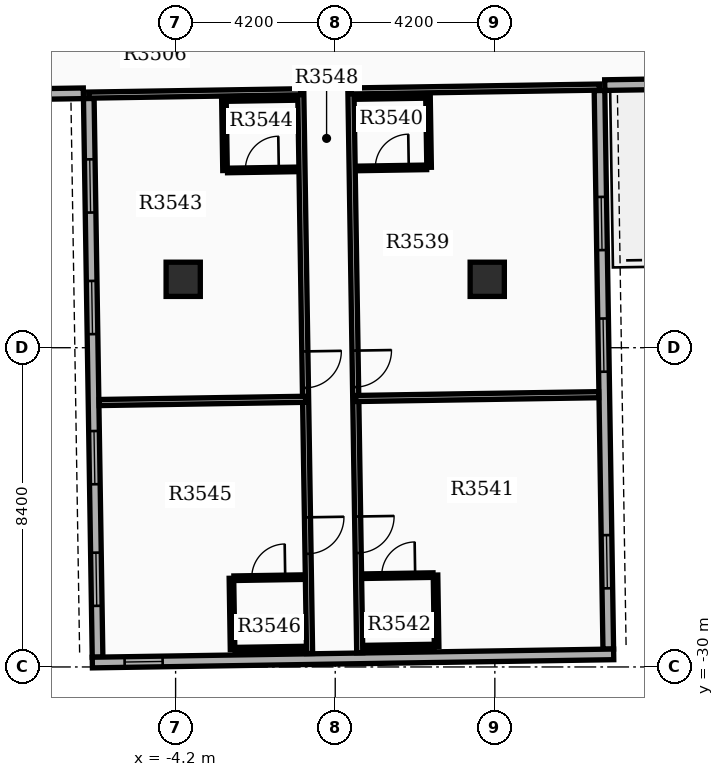
"""IFC4 building model, lengths in metres.
Left out: names, types, materials, properties, quantities, classifications, styles, units other than length and angle.
Written with IfcOpenShell. Run it as: python <this file> out.ifc"""

import sys

from ifc_helpers import new_model, si_unit, direction, frame, frame_2d, origin, origin_2d, place, context, subcontext, project, spatial, rectangle, extrude, element, fill, save


model = new_model("IFC4")
c1 = context("Model", 3, precision=1e-05, world=origin(), true_north=direction((0.0, 1.0)))
c2 = subcontext(c1, "Body", "Model", "MODEL_VIEW")
j1 = project(units=[si_unit("LENGTHUNIT", "METRE"), si_unit("PLANEANGLEUNIT", "RADIAN")], contexts=[c1])
p1 = place(None, origin())
s1 = spatial("IfcSite", under=j1, at=p1, CompositionType="ELEMENT")
p2 = place(p1, origin())
s2 = spatial("IfcBuilding", under=s1, at=p2, CompositionType="ELEMENT")
p3 = place(p2, frame((0.0, 0.0, 220.8)))
s3 = spatial("IfcBuildingStorey", under=s2, at=p3, CompositionType="ELEMENT", Elevation=220.8)
for number, where, z_axis, x_axis in (
    (1, (-4.0, -19.8, 0.0), (0.0, 0.0, 1.0), (1.0, 0.0, 0.0)),
    (2, (4.0, -19.8, 0.0), (0.0, 0.0, 1.0), (1.0, 0.0, 0.0)),
):
    element("IfcColumn", number, at=place(p3, frame(where, z_axis=z_axis, x_axis=x_axis)), inside=s3, PredefinedType="COLUMN", context=c2, shape_type="SweptSolid", body=[
        extrude(rectangle(XDim=0.9, YDim=0.9, at=origin_2d()), origin(), (0.0, 0.0, 1.0), 3.9),
    ])
p4 = place(p3, frame((-6.485, -15.044, 0.0), z_axis=(0.0, 0.0, 1.0), x_axis=(0.015711302158, -0.999876569875, 0.0)))
e3 = element("IfcWall", 3, at=p4, inside=s3, PredefinedType="STANDARD", context=c2, shape_type="SweptSolid", body=[
    extrude(rectangle(XDim=14.7, YDim=0.28, at=frame_2d((7.35, 0.0))), origin(), (0.0, 0.0, 1.0), 3.18),
])
p5 = place(p4, frame((1.6, 0.0, 0.8)))
e4 = element("IfcOpeningElement", 4, at=p5, cuts=e3, PredefinedType="OPENING", context=c2, shape_type="SweptSolid", body=[
    extrude(rectangle(XDim=1.4, YDim=1.6, at=frame_2d((0.7, 0.8))), frame((0.0, 0.15, 0.0), z_axis=(0.0, -1.0, 0.0), x_axis=(1.0, 0.0, 0.0)), (0.0, 0.0, 1.0), 0.3),
])
p6 = place(p4, frame((4.8, 0.0, 0.8)))
e5 = element("IfcOpeningElement", 5, at=p6, cuts=e3, PredefinedType="OPENING", context=c2, shape_type="SweptSolid", body=[
    extrude(rectangle(XDim=1.4, YDim=1.6, at=frame_2d((0.7, 0.8))), frame((0.0, 0.15, 0.0), z_axis=(0.0, -1.0, 0.0), x_axis=(1.0, 0.0, 0.0)), (0.0, 0.0, 1.0), 0.3),
])
p7 = place(p4, frame((8.75, 0.0, 0.8)))
e6 = element("IfcOpeningElement", 6, at=p7, cuts=e3, PredefinedType="OPENING", context=c2, shape_type="SweptSolid", body=[
    extrude(rectangle(XDim=1.4, YDim=1.6, at=frame_2d((0.7, 0.8))), frame((0.0, 0.15, 0.0), z_axis=(0.0, -1.0, 0.0), x_axis=(1.0, 0.0, 0.0)), (0.0, 0.0, 1.0), 0.3),
])
p8 = place(p4, frame((11.95, 0.0, 0.8)))
e7 = element("IfcOpeningElement", 7, at=p8, cuts=e3, PredefinedType="OPENING", context=c2, shape_type="SweptSolid", body=[
    extrude(rectangle(XDim=1.4, YDim=1.6, at=frame_2d((0.7, 0.8))), frame((0.0, 0.15, 0.0), z_axis=(0.0, -1.0, 0.0), x_axis=(1.0, 0.0, 0.0)), (0.0, 0.0, 1.0), 0.3),
])
p9 = place(p3, frame((7.185, -29.531, 0.0), z_axis=(0.0, 0.0, 1.0), x_axis=(-0.015711302158, 0.999876569875, 0.0)))
e8 = element("IfcWall", 8, at=p9, inside=s3, PredefinedType="STANDARD", context=c2, shape_type="SweptSolid", body=[
    extrude(rectangle(XDim=14.7, YDim=0.28, at=frame_2d((7.35, 0.0))), origin(), (0.0, 0.0, 1.0), 3.18),
])
p10 = place(p9, frame((1.6, 0.0, 0.8)))
e9 = element("IfcOpeningElement", 9, at=p10, cuts=e8, PredefinedType="OPENING", context=c2, shape_type="SweptSolid", body=[
    extrude(rectangle(XDim=1.4, YDim=1.6, at=frame_2d((0.7, 0.8))), frame((0.0, 0.15, 0.0), z_axis=(0.0, -1.0, 0.0), x_axis=(1.0, 0.0, 0.0)), (0.0, 0.0, 1.0), 0.3),
])
p11 = place(p9, frame((7.3, 0.0, 0.8)))
e10 = element("IfcOpeningElement", 10, at=p11, cuts=e8, PredefinedType="OPENING", context=c2, shape_type="SweptSolid", body=[
    extrude(rectangle(XDim=1.4, YDim=1.6, at=frame_2d((0.7, 0.8))), frame((0.0, 0.15, 0.0), z_axis=(0.0, -1.0, 0.0), x_axis=(1.0, 0.0, 0.0)), (0.0, 0.0, 1.0), 0.3),
])
p12 = place(p9, frame((10.5, 0.0, 0.8)))
e11 = element("IfcOpeningElement", 11, at=p12, cuts=e8, PredefinedType="OPENING", context=c2, shape_type="SweptSolid", body=[
    extrude(rectangle(XDim=1.4, YDim=1.6, at=frame_2d((0.7, 0.8))), frame((0.0, 0.15, 0.0), z_axis=(0.0, -1.0, 0.0), x_axis=(1.0, 0.0, 0.0)), (0.0, 0.0, 1.0), 0.3),
])
p13 = place(p3, frame((-6.391, -29.884, 0.0), z_axis=(0.0, 0.0, 1.0), x_axis=(0.999876828887, 0.015694809807, 0.0)))
e12 = element("IfcWall", 12, at=p13, inside=s3, PredefinedType="STANDARD", context=c2, shape_type="SweptSolid", body=[
    extrude(rectangle(XDim=13.72, YDim=0.28, at=frame_2d((6.86, 0.0))), origin(), (0.0, 0.0, 1.0), 3.18),
])
p14 = place(p13, frame((0.85, 0.0, 0.85)))
e13 = element("IfcOpeningElement", 13, at=p14, cuts=e12, PredefinedType="OPENING", context=c2, shape_type="SweptSolid", body=[
    extrude(rectangle(XDim=1.0, YDim=1.5, at=frame_2d((0.5, 0.75))), frame((0.0, 0.15, 0.0), z_axis=(0.0, -1.0, 0.0), x_axis=(1.0, 0.0, 0.0)), (0.0, 0.0, 1.0), 0.3),
])
p15 = place(p3, frame((-12.926, -15.005, 0.0), z_axis=(0.0, 0.0, 1.0), x_axis=(0.999876823822, 0.015695132501, 0.0)))
e14 = element("IfcWall", 14, at=p15, inside=s3, PredefinedType="STANDARD", context=c2, shape_type="SweptSolid", body=[
    extrude(rectangle(XDim=6.3, YDim=0.28, at=frame_2d((3.15, 0.0))), origin(), (0.0, 0.0, 1.0), 3.18),
])
p16 = place(p3, frame((13.391, -14.592, 0.0), z_axis=(0.0, 0.0, 1.0), x_axis=(-0.999876833368, -0.015694524359, 0.0)))
e15 = element("IfcWall", 15, at=p16, inside=s3, PredefinedType="STANDARD", context=c2, shape_type="SweptSolid", body=[
    extrude(rectangle(XDim=6.3, YDim=0.28, at=frame_2d((3.15, 0.0))), origin(), (0.0, 0.0, 1.0), 3.18),
])
p17 = place(p3, frame((0.413, -14.845, 0.0), z_axis=(0.0, 0.0, 1.0), x_axis=(0.015723196507, -0.999876382905, 0.0)))
e16 = element("IfcWall", 16, at=p17, inside=s3, PredefinedType="PARTITIONING", context=c2, shape_type="SweptSolid", body=[
    extrude(rectangle(XDim=14.782, YDim=0.16, at=frame_2d((7.391, 0.0))), origin(), (0.0, 0.0, 1.0), 3.17),
])
p18 = place(p17, frame((6.832, 0.0, 0.0)))
e17 = element("IfcOpeningElement", 17, at=p18, cuts=e16, PredefinedType="OPENING", context=c2, shape_type="SweptSolid", body=[
    extrude(rectangle(XDim=0.96, YDim=2.15, at=frame_2d((0.48, 1.075))), frame((0.0, 0.09, 0.0), z_axis=(0.0, -1.0, 0.0), x_axis=(1.0, 0.0, 0.0)), (0.0, 0.0, 1.0), 0.18),
])
p19 = place(p17, frame((11.198, 0.0, 0.0)))
e18 = element("IfcOpeningElement", 18, at=p19, cuts=e16, PredefinedType="OPENING", context=c2, shape_type="SweptSolid", body=[
    extrude(rectangle(XDim=0.96, YDim=2.15, at=frame_2d((0.48, 1.075))), frame((0.0, 0.09, 0.0), z_axis=(0.0, -1.0, 0.0), x_axis=(1.0, 0.0, 0.0)), (0.0, 0.0, 1.0), 0.18),
])
p20 = place(p3, frame((0.413, -14.845, 0.0), z_axis=(0.0, 0.0, 1.0), x_axis=(0.999877084909, 0.015678490784, 0.0)))
e19 = element("IfcWall", 19, at=p20, inside=s3, PredefinedType="PARTITIONING", context=c2, shape_type="SweptSolid", body=[
    extrude(rectangle(XDim=6.54, YDim=0.16, at=frame_2d((3.27, 0.0))), origin(), (0.0, 0.0, 1.0), 3.17),
])
p21 = place(p3, frame((0.54, -22.936, 0.0), z_axis=(0.0, 0.0, 1.0), x_axis=(0.999876774542, 0.015698271615, 0.0)))
e20 = element("IfcWall", 20, at=p21, inside=s3, PredefinedType="PARTITIONING", context=c2, shape_type="SweptSolid", body=[
    extrude(rectangle(XDim=6.392, YDim=0.16, at=frame_2d((3.196, 0.0))), origin(), (0.0, 0.0, 1.0), 3.17),
])
p22 = place(p3, frame((0.585, -16.883, 0.0), z_axis=(0.0, 0.0, 1.0), x_axis=(0.999876836305, 0.015694337248, 0.0)))
e21 = element("IfcWall", 21, at=p22, inside=s3, PredefinedType="PARTITIONING", context=c2, shape_type="SweptSolid", body=[
    extrude(rectangle(XDim=1.82, YDim=0.12, at=frame_2d((0.91, 0.0))), origin(), (0.0, 0.0, 1.0), 3.17),
])
p23 = place(p22, frame((0.47, 0.0, 0.0)))
e22 = element("IfcOpeningElement", 22, at=p23, cuts=e21, PredefinedType="OPENING", context=c2, shape_type="SweptSolid", body=[
    extrude(rectangle(XDim=0.88, YDim=2.1, at=frame_2d((0.44, 1.05))), frame((0.0, 0.07, 0.0), z_axis=(0.0, -1.0, 0.0), x_axis=(1.0, 0.0, 0.0)), (0.0, 0.0, 1.0), 0.14),
])
p24 = place(p3, frame((0.556, -15.003, 0.0), z_axis=(0.0, 0.0, 1.0), x_axis=(0.999876836305, 0.015694337248, 0.0)))
e23 = element("IfcWall", 23, at=p24, inside=s3, PredefinedType="PARTITIONING", context=c2, shape_type="SweptSolid", body=[
    extrude(rectangle(XDim=1.82, YDim=0.12, at=frame_2d((0.91, 0.0))), origin(), (0.0, 0.0, 1.0), 3.17),
])
p25 = place(p3, frame((2.44, -14.973, 0.0), z_axis=(0.0, 0.0, 1.0), x_axis=(0.01571234584, -0.999876553475, 0.0)))
e24 = element("IfcWall", 24, at=p25, inside=s3, PredefinedType="PARTITIONING", context=c2, shape_type="SweptSolid", body=[
    extrude(rectangle(XDim=1.88, YDim=0.12, at=frame_2d((0.94, 0.0))), origin(), (0.0, 0.0, 1.0), 3.17),
])
p26 = place(p3, frame((0.754, -27.612, 0.0), z_axis=(0.0, 0.0, 1.0), x_axis=(0.999876803258, 0.015696442504, 0.0)))
e25 = element("IfcWall", 25, at=p26, inside=s3, PredefinedType="PARTITIONING", context=c2, shape_type="SweptSolid", body=[
    extrude(rectangle(XDim=1.82, YDim=0.12, at=frame_2d((0.91, 0.0))), origin(), (0.0, 0.0, 1.0), 3.17),
])
p27 = place(p26, frame((0.47, 0.0, 0.0)))
e26 = element("IfcOpeningElement", 26, at=p27, cuts=e25, PredefinedType="OPENING", context=c2, shape_type="SweptSolid", body=[
    extrude(rectangle(XDim=0.88, YDim=2.1, at=frame_2d((0.44, 1.05))), frame((0.0, 0.07, 0.0), z_axis=(0.0, -1.0, 0.0), x_axis=(1.0, 0.0, 0.0)), (0.0, 0.0, 1.0), 0.14),
])
p28 = place(p3, frame((0.783, -29.491, 0.0), z_axis=(0.0, 0.0, 1.0), x_axis=(0.999876836305, 0.015694337248, 0.0)))
e27 = element("IfcWall", 27, at=p28, inside=s3, PredefinedType="PARTITIONING", context=c2, shape_type="SweptSolid", body=[
    extrude(rectangle(XDim=1.82, YDim=0.12, at=frame_2d((0.91, 0.0))), origin(), (0.0, 0.0, 1.0), 3.17),
])
p29 = place(p3, frame((2.639, -27.582, 0.0), z_axis=(0.0, 0.0, 1.0), x_axis=(0.015714386166, -0.99987652141, 0.0)))
e28 = element("IfcWall", 28, at=p29, inside=s3, PredefinedType="PARTITIONING", context=c2, shape_type="SweptSolid", body=[
    extrude(rectangle(XDim=1.88, YDim=0.12, at=frame_2d((0.94, 0.0))), origin(), (0.0, 0.0, 1.0), 3.17),
])
p30 = place(p3, frame((-0.906, -14.866, 0.0), z_axis=(0.0, 0.0, 1.0), x_axis=(0.015706944004, -0.999876638346, 0.0)))
e29 = element("IfcWall", 29, at=p30, inside=s3, PredefinedType="PARTITIONING", context=c2, shape_type="SweptSolid", body=[
    extrude(rectangle(XDim=14.782, YDim=0.16, at=frame_2d((7.391, 0.0))), origin(), (0.0, 0.0, 1.0), 3.17),
])
p31 = place(p30, frame((6.832, 0.0, 0.0)))
e30 = element("IfcOpeningElement", 30, at=p31, cuts=e29, PredefinedType="OPENING", context=c2, shape_type="SweptSolid", body=[
    extrude(rectangle(XDim=0.96, YDim=2.15, at=frame_2d((0.48, 1.075))), frame((0.0, 0.09, 0.0), z_axis=(0.0, -1.0, 0.0), x_axis=(1.0, 0.0, 0.0)), (0.0, 0.0, 1.0), 0.18),
])
p32 = place(p30, frame((11.198, 0.0, 0.0)))
e31 = element("IfcOpeningElement", 31, at=p32, cuts=e29, PredefinedType="OPENING", context=c2, shape_type="SweptSolid", body=[
    extrude(rectangle(XDim=0.96, YDim=2.15, at=frame_2d((0.48, 1.075))), frame((0.0, 0.09, 0.0), z_axis=(0.0, -1.0, 0.0), x_axis=(1.0, 0.0, 0.0)), (0.0, 0.0, 1.0), 0.18),
])
p33 = place(p3, frame((-0.906, -14.866, 0.0), z_axis=(0.0, 0.0, 1.0), x_axis=(-0.99987732115, -0.015663417537, 0.0)))
e32 = element("IfcWall", 32, at=p33, inside=s3, PredefinedType="PARTITIONING", context=c2, shape_type="SweptSolid", body=[
    extrude(rectangle(XDim=5.58, YDim=0.16, at=frame_2d((2.79, 0.0))), origin(), (0.0, 0.0, 1.0), 3.17),
])
p34 = place(p3, frame((-0.78, -22.957, 0.0), z_axis=(0.0, 0.0, 1.0), x_axis=(-0.999876256724, -0.015731218639, 0.0)))
e33 = element("IfcWall", 33, at=p34, inside=s3, PredefinedType="PARTITIONING", context=c2, shape_type="SweptSolid", body=[
    extrude(rectangle(XDim=5.432, YDim=0.16, at=frame_2d((2.716, 0.0))), origin(), (0.0, 0.0, 1.0), 3.17),
])
p35 = place(p3, frame((-2.834, -16.937, 0.0), z_axis=(0.0, 0.0, 1.0), x_axis=(0.999876836305, 0.015694337248, 0.0)))
e34 = element("IfcWall", 34, at=p35, inside=s3, PredefinedType="PARTITIONING", context=c2, shape_type="SweptSolid", body=[
    extrude(rectangle(XDim=1.82, YDim=0.12, at=frame_2d((0.91, 0.0))), origin(), (0.0, 0.0, 1.0), 3.17),
])
p36 = place(p35, frame((0.47, 0.0, 0.0)))
e35 = element("IfcOpeningElement", 35, at=p36, cuts=e34, PredefinedType="OPENING", context=c2, shape_type="SweptSolid", body=[
    extrude(rectangle(XDim=0.88, YDim=2.1, at=frame_2d((0.44, 1.05))), frame((0.0, 0.07, 0.0), z_axis=(0.0, -1.0, 0.0), x_axis=(1.0, 0.0, 0.0)), (0.0, 0.0, 1.0), 0.14),
])
p37 = place(p3, frame((-2.864, -15.057, 0.0), z_axis=(0.0, 0.0, 1.0), x_axis=(0.999876836305, 0.015694337248, 0.0)))
e36 = element("IfcWall", 36, at=p37, inside=s3, PredefinedType="PARTITIONING", context=c2, shape_type="SweptSolid", body=[
    extrude(rectangle(XDim=1.82, YDim=0.12, at=frame_2d((0.91, 0.0))), origin(), (0.0, 0.0, 1.0), 3.17),
])
p38 = place(p3, frame((-2.929, -15.058, 0.0), z_axis=(0.0, 0.0, 1.0), x_axis=(0.01558454688, -0.999878553575, 0.0)))
e37 = element("IfcWall", 37, at=p38, inside=s3, PredefinedType="PARTITIONING", context=c2, shape_type="SweptSolid", body=[
    extrude(rectangle(XDim=1.88, YDim=0.12, at=frame_2d((0.94, 0.0))), origin(), (0.0, 0.0, 1.0), 3.17),
])
p39 = place(p3, frame((-2.666, -27.665, 0.0), z_axis=(0.0, 0.0, 1.0), x_axis=(0.999876836305, 0.015694337248, 0.0)))
e38 = element("IfcWall", 38, at=p39, inside=s3, PredefinedType="PARTITIONING", context=c2, shape_type="SweptSolid", body=[
    extrude(rectangle(XDim=1.82, YDim=0.12, at=frame_2d((0.91, 0.0))), origin(), (0.0, 0.0, 1.0), 3.17),
])
p40 = place(p39, frame((0.47, 0.0, 0.0)))
e39 = element("IfcOpeningElement", 39, at=p40, cuts=e38, PredefinedType="OPENING", context=c2, shape_type="SweptSolid", body=[
    extrude(rectangle(XDim=0.88, YDim=2.1, at=frame_2d((0.44, 1.05))), frame((0.0, 0.07, 0.0), z_axis=(0.0, -1.0, 0.0), x_axis=(1.0, 0.0, 0.0)), (0.0, 0.0, 1.0), 0.14),
])
p41 = place(p3, frame((-2.636, -29.545, 0.0), z_axis=(0.0, 0.0, 1.0), x_axis=(0.999876836305, 0.015694337248, 0.0)))
e40 = element("IfcWall", 40, at=p41, inside=s3, PredefinedType="PARTITIONING", context=c2, shape_type="SweptSolid", body=[
    extrude(rectangle(XDim=1.82, YDim=0.12, at=frame_2d((0.91, 0.0))), origin(), (0.0, 0.0, 1.0), 3.17),
])
p42 = place(p3, frame((-2.731, -27.666, 0.0), z_axis=(0.0, 0.0, 1.0), x_axis=(0.01571234584, -0.999876553475, 0.0)))
e41 = element("IfcWall", 41, at=p42, inside=s3, PredefinedType="PARTITIONING", context=c2, shape_type="SweptSolid", body=[
    extrude(rectangle(XDim=1.88, YDim=0.12, at=frame_2d((0.94, 0.0))), origin(), (0.0, 0.0, 1.0), 3.17),
])
p43 = place(p5, origin())
e42 = element("IfcWindow", 42, at=p43, inside=s3, PartitioningType="SINGLE_PANEL", PredefinedType="WINDOW", context=c2, shape_type="SweptSolid", body=[
    extrude(rectangle(XDim=1.4, YDim=1.6, at=frame_2d((0.7, 0.8))), frame((0.0, 0.03, 0.0), z_axis=(0.0, -1.0, 0.0), x_axis=(1.0, 0.0, 0.0)), (0.0, 0.0, 1.0), 0.06),
])
fill(e4, e42)
p44 = place(p6, origin())
e43 = element("IfcWindow", 43, at=p44, inside=s3, PartitioningType="SINGLE_PANEL", PredefinedType="WINDOW", context=c2, shape_type="SweptSolid", body=[
    extrude(rectangle(XDim=1.4, YDim=1.6, at=frame_2d((0.7, 0.8))), frame((0.0, 0.03, 0.0), z_axis=(0.0, -1.0, 0.0), x_axis=(1.0, 0.0, 0.0)), (0.0, 0.0, 1.0), 0.06),
])
fill(e5, e43)
p45 = place(p7, origin())
e44 = element("IfcWindow", 44, at=p45, inside=s3, PartitioningType="SINGLE_PANEL", PredefinedType="WINDOW", context=c2, shape_type="SweptSolid", body=[
    extrude(rectangle(XDim=1.4, YDim=1.6, at=frame_2d((0.7, 0.8))), frame((0.0, 0.03, 0.0), z_axis=(0.0, -1.0, 0.0), x_axis=(1.0, 0.0, 0.0)), (0.0, 0.0, 1.0), 0.06),
])
fill(e6, e44)
p46 = place(p8, origin())
e45 = element("IfcWindow", 45, at=p46, inside=s3, PartitioningType="SINGLE_PANEL", PredefinedType="WINDOW", context=c2, shape_type="SweptSolid", body=[
    extrude(rectangle(XDim=1.4, YDim=1.6, at=frame_2d((0.7, 0.8))), frame((0.0, 0.03, 0.0), z_axis=(0.0, -1.0, 0.0), x_axis=(1.0, 0.0, 0.0)), (0.0, 0.0, 1.0), 0.06),
])
fill(e7, e45)
p47 = place(p10, origin())
e46 = element("IfcWindow", 46, at=p47, inside=s3, PartitioningType="SINGLE_PANEL", PredefinedType="WINDOW", context=c2, shape_type="SweptSolid", body=[
    extrude(rectangle(XDim=1.4, YDim=1.6, at=frame_2d((0.7, 0.8))), frame((0.0, 0.03, 0.0), z_axis=(0.0, -1.0, 0.0), x_axis=(1.0, 0.0, 0.0)), (0.0, 0.0, 1.0), 0.06),
])
fill(e9, e46)
p48 = place(p11, origin())
e47 = element("IfcWindow", 47, at=p48, inside=s3, PartitioningType="SINGLE_PANEL", PredefinedType="WINDOW", context=c2, shape_type="SweptSolid", body=[
    extrude(rectangle(XDim=1.4, YDim=1.6, at=frame_2d((0.7, 0.8))), frame((0.0, 0.03, 0.0), z_axis=(0.0, -1.0, 0.0), x_axis=(1.0, 0.0, 0.0)), (0.0, 0.0, 1.0), 0.06),
])
fill(e10, e47)
p49 = place(p12, origin())
e48 = element("IfcWindow", 48, at=p49, inside=s3, PartitioningType="SINGLE_PANEL", PredefinedType="WINDOW", context=c2, shape_type="SweptSolid", body=[
    extrude(rectangle(XDim=1.4, YDim=1.6, at=frame_2d((0.7, 0.8))), frame((0.0, 0.03, 0.0), z_axis=(0.0, -1.0, 0.0), x_axis=(1.0, 0.0, 0.0)), (0.0, 0.0, 1.0), 0.06),
])
fill(e11, e48)
p50 = place(p14, origin())
e49 = element("IfcWindow", 49, at=p50, inside=s3, PartitioningType="SINGLE_PANEL", PredefinedType="WINDOW", context=c2, shape_type="SweptSolid", body=[
    extrude(rectangle(XDim=1.0, YDim=1.5, at=frame_2d((0.5, 0.75))), frame((0.0, 0.03, 0.0), z_axis=(0.0, -1.0, 0.0), x_axis=(1.0, 0.0, 0.0)), (0.0, 0.0, 1.0), 0.06),
])
fill(e13, e49)
p51 = place(p18, origin())
e50 = element("IfcDoor", 50, at=p51, inside=s3, OperationType="SINGLE_SWING_LEFT", PredefinedType="DOOR", context=c2, shape_type="SweptSolid", body=[
    extrude(rectangle(XDim=0.96, YDim=2.15, at=frame_2d((0.48, 1.075))), frame((0.0, 0.025, 0.0), z_axis=(0.0, -1.0, 0.0), x_axis=(1.0, 0.0, 0.0)), (0.0, 0.0, 1.0), 0.05),
])
fill(e17, e50)
p52 = place(p23, origin())
e51 = element("IfcDoor", 51, at=p52, inside=s3, OperationType="SINGLE_SWING_RIGHT", PredefinedType="DOOR", context=c2, shape_type="SweptSolid", body=[
    extrude(rectangle(XDim=0.88, YDim=2.1, at=frame_2d((0.44, 1.05))), frame((0.0, 0.025, 0.0), z_axis=(0.0, -1.0, 0.0), x_axis=(1.0, 0.0, 0.0)), (0.0, 0.0, 1.0), 0.05),
])
fill(e22, e51)
p53 = place(p19, origin())
e52 = element("IfcDoor", 52, at=p53, inside=s3, OperationType="SINGLE_SWING_LEFT", PredefinedType="DOOR", context=c2, shape_type="SweptSolid", body=[
    extrude(rectangle(XDim=0.96, YDim=2.15, at=frame_2d((0.48, 1.075))), frame((0.0, 0.025, 0.0), z_axis=(0.0, -1.0, 0.0), x_axis=(1.0, 0.0, 0.0)), (0.0, 0.0, 1.0), 0.05),
])
fill(e18, e52)
p54 = place(p27, origin())
e53 = element("IfcDoor", 53, at=p54, inside=s3, OperationType="SINGLE_SWING_RIGHT", PredefinedType="DOOR", context=c2, shape_type="SweptSolid", body=[
    extrude(rectangle(XDim=0.88, YDim=2.1, at=frame_2d((0.44, 1.05))), frame((0.0, 0.025, 0.0), z_axis=(0.0, -1.0, 0.0), x_axis=(1.0, 0.0, 0.0)), (0.0, 0.0, 1.0), 0.05),
])
fill(e26, e53)
p55 = place(p31, origin())
e54 = element("IfcDoor", 54, at=p55, inside=s3, OperationType="SINGLE_SWING_LEFT", PredefinedType="DOOR", context=c2, shape_type="SweptSolid", body=[
    extrude(rectangle(XDim=0.96, YDim=2.15, at=frame_2d((0.48, 1.075))), frame((0.0, 0.025, 0.0), z_axis=(0.0, -1.0, 0.0), x_axis=(1.0, 0.0, 0.0)), (0.0, 0.0, 1.0), 0.05),
])
fill(e30, e54)
p56 = place(p36, origin())
e55 = element("IfcDoor", 55, at=p56, inside=s3, OperationType="SINGLE_SWING_RIGHT", PredefinedType="DOOR", context=c2, shape_type="SweptSolid", body=[
    extrude(rectangle(XDim=0.88, YDim=2.1, at=frame_2d((0.44, 1.05))), frame((0.0, 0.025, 0.0), z_axis=(0.0, -1.0, 0.0), x_axis=(1.0, 0.0, 0.0)), (0.0, 0.0, 1.0), 0.05),
])
fill(e35, e55)
p57 = place(p32, origin())
e56 = element("IfcDoor", 56, at=p57, inside=s3, OperationType="SINGLE_SWING_LEFT", PredefinedType="DOOR", context=c2, shape_type="SweptSolid", body=[
    extrude(rectangle(XDim=0.96, YDim=2.15, at=frame_2d((0.48, 1.075))), frame((0.0, 0.025, 0.0), z_axis=(0.0, -1.0, 0.0), x_axis=(1.0, 0.0, 0.0)), (0.0, 0.0, 1.0), 0.05),
])
fill(e31, e56)
p58 = place(p40, origin())
e57 = element("IfcDoor", 57, at=p58, inside=s3, OperationType="SINGLE_SWING_RIGHT", PredefinedType="DOOR", context=c2, shape_type="SweptSolid", body=[
    extrude(rectangle(XDim=0.88, YDim=2.1, at=frame_2d((0.44, 1.05))), frame((0.0, 0.025, 0.0), z_axis=(0.0, -1.0, 0.0), x_axis=(1.0, 0.0, 0.0)), (0.0, 0.0, 1.0), 0.05),
])
fill(e39, e57)
save(model, sys.argv[1])
